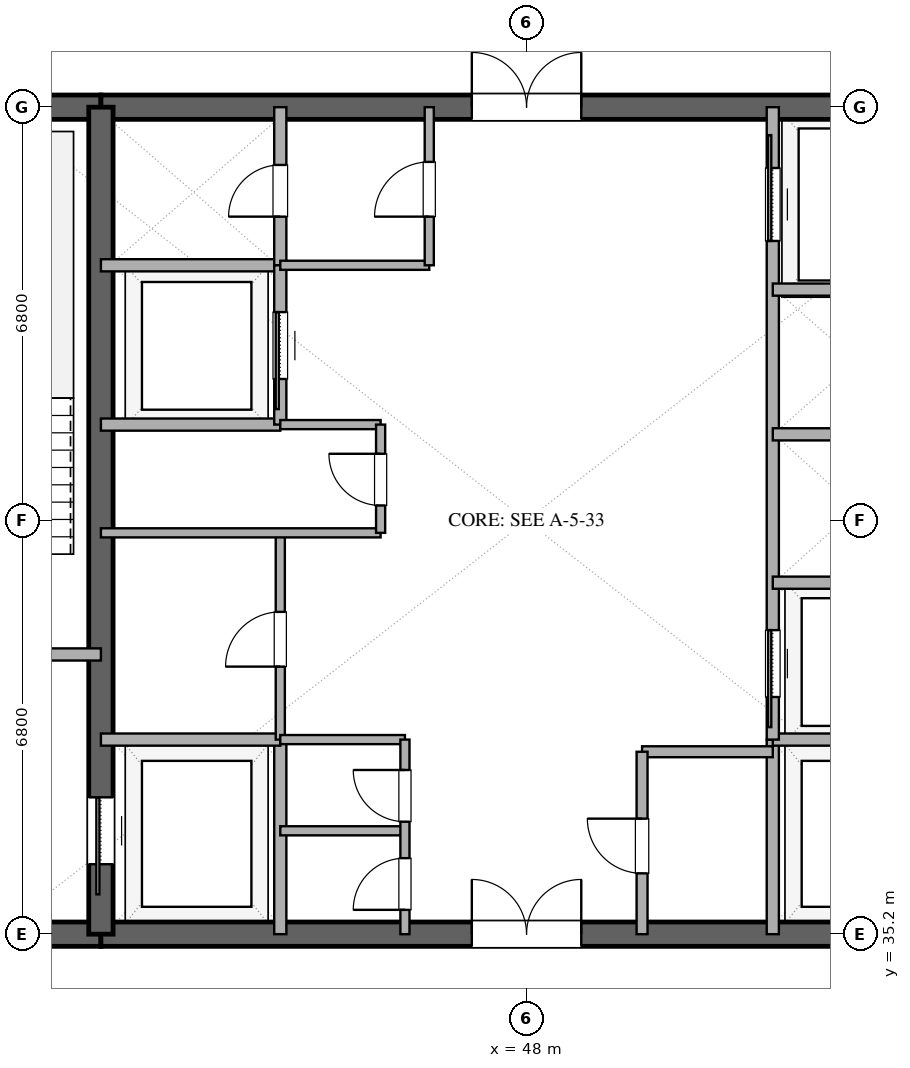
"""IFC4 building model, lengths in metres.
Left out: names, types, materials, properties, quantities, classifications, styles, units other than length and angle.
Written with IfcOpenShell. Run it as: python <this file> out.ifc"""

import sys

from ifc_helpers import new_model, si_unit, direction, frame, frame_2d, origin, place, context, subcontext, project, spatial, rectangle, extrude, element, fill, save


model = new_model("IFC4")
c1 = context("Model", 3, precision=1e-05, world=origin(), true_north=direction((0.0, 1.0)))
c2 = subcontext(c1, "Body", "Model", "MODEL_VIEW")
j1 = project(units=[si_unit("LENGTHUNIT", "METRE"), si_unit("PLANEANGLEUNIT", "RADIAN")], contexts=[c1])
p1 = place(None, origin())
s1 = spatial("IfcSite", under=j1, at=p1, CompositionType="ELEMENT")
p2 = place(p1, origin())
s2 = spatial("IfcBuilding", under=s1, at=p2, CompositionType="ELEMENT")
p3 = place(p2, frame((0.0, 0.0, 217.2)))
s3 = spatial("IfcBuildingStorey", under=s2, at=p3, CompositionType="ELEMENT", Elevation=217.2)
p4 = place(p3, frame((37.0, 35.2, 0.0), z_axis=(0.0, 0.0, 1.0), x_axis=(1.0, 0.0, 0.0)))
e1 = element("IfcWall", 1, at=p4, inside=s3, PredefinedType="SHEAR", context=c2, shape_type="SweptSolid", body=[
    extrude(rectangle(XDim=4.0, YDim=0.4, at=frame_2d((2.0, 0.0))), origin(), (0.0, 0.0, 1.0), 3.36),
])
p5 = place(p4, frame((1.4, 0.0, 0.0)))
e2 = element("IfcOpeningElement", 2, at=p5, cuts=e1, PredefinedType="OPENING", context=c2, shape_type="SweptSolid", body=[
    extrude(rectangle(XDim=1.2, YDim=2.15, at=frame_2d((0.6, 1.075))), frame((0.0, 0.21, 0.0), z_axis=(0.0, -1.0, 0.0), x_axis=(1.0, 0.0, 0.0)), (0.0, 0.0, 1.0), 0.42),
])
p6 = place(p3, frame((41.0, 35.2, 0.0), z_axis=(0.0, 0.0, 1.0), x_axis=(1.0, 0.0, 0.0)))
e3 = element("IfcWall", 3, at=p6, inside=s3, PredefinedType="SHEAR", context=c2, shape_type="SweptSolid", body=[
    extrude(rectangle(XDim=14.0, YDim=0.4, at=frame_2d((7.0, 0.0))), origin(), (0.0, 0.0, 1.0), 3.36),
])
p7 = place(p6, frame((6.1, 0.0, 0.0)))
e4 = element("IfcOpeningElement", 4, at=p7, cuts=e3, PredefinedType="OPENING", context=c2, shape_type="SweptSolid", body=[
    extrude(rectangle(XDim=1.8, YDim=2.25, at=frame_2d((0.9, 1.125))), frame((0.0, 0.21, 0.0), z_axis=(0.0, -1.0, 0.0), x_axis=(1.0, 0.0, 0.0)), (0.0, 0.0, 1.0), 0.42),
])
p8 = place(p3, frame((37.0, 48.8, 0.0), z_axis=(0.0, 0.0, 1.0), x_axis=(1.0, 0.0, 0.0)))
e5 = element("IfcWall", 5, at=p8, inside=s3, PredefinedType="SHEAR", context=c2, shape_type="SweptSolid", body=[
    extrude(rectangle(XDim=4.0, YDim=0.4, at=frame_2d((2.0, 0.0))), origin(), (0.0, 0.0, 1.0), 3.36),
])
p9 = place(p3, frame((41.0, 48.8, 0.0), z_axis=(0.0, 0.0, 1.0), x_axis=(1.0, 0.0, 0.0)))
e6 = element("IfcWall", 6, at=p9, inside=s3, PredefinedType="SHEAR", context=c2, shape_type="SweptSolid", body=[
    extrude(rectangle(XDim=14.0, YDim=0.4, at=frame_2d((7.0, 0.0))), origin(), (0.0, 0.0, 1.0), 3.36),
])
p10 = place(p9, frame((6.1, 0.0, 0.0)))
e7 = element("IfcOpeningElement", 7, at=p10, cuts=e6, PredefinedType="OPENING", context=c2, shape_type="SweptSolid", body=[
    extrude(rectangle(XDim=1.8, YDim=2.25, at=frame_2d((0.9, 1.125))), frame((0.0, 0.21, 0.0), z_axis=(0.0, -1.0, 0.0), x_axis=(1.0, 0.0, 0.0)), (0.0, 0.0, 1.0), 0.42),
])
p11 = place(p3, frame((41.0, 35.2, 0.0), z_axis=(0.0, 0.0, 1.0), x_axis=(0.0, 1.0, 0.0)))
e8 = element("IfcWall", 8, at=p11, inside=s3, PredefinedType="SHEAR", context=c2, shape_type="SweptSolid", body=[
    extrude(rectangle(XDim=13.6, YDim=0.4, at=frame_2d((6.8, 0.0))), origin(), (0.0, 0.0, 1.0), 3.36),
])
p12 = place(p11, frame((1.15, 0.0, 0.0)))
e9 = element("IfcOpeningElement", 9, at=p12, cuts=e8, PredefinedType="OPENING", context=c2, shape_type="SweptSolid", body=[
    extrude(rectangle(XDim=1.1, YDim=2.2, at=frame_2d((0.55, 1.1))), frame((0.0, 0.21, 0.0), z_axis=(0.0, -1.0, 0.0), x_axis=(1.0, 0.0, 0.0)), (0.0, 0.0, 1.0), 0.42),
])
p13 = place(p3, frame((37.0, 39.8, 0.0), z_axis=(0.0, 0.0, 1.0), x_axis=(1.0, 0.0, 0.0)))
e10 = element("IfcWall", 10, at=p13, inside=s3, PredefinedType="SOLIDWALL", context=c2, shape_type="SweptSolid", body=[
    extrude(rectangle(XDim=4.0, YDim=0.2, at=frame_2d((2.0, 0.0))), origin(), (0.0, 0.0, 1.0), 2.72),
])
p14 = place(p13, frame((1.45, 0.0, 0.0)))
e11 = element("IfcOpeningElement", 11, at=p14, cuts=e10, PredefinedType="OPENING", context=c2, shape_type="SweptSolid", body=[
    extrude(rectangle(XDim=1.1, YDim=2.15, at=frame_2d((0.55, 1.075))), frame((0.0, 0.11, 0.0), z_axis=(0.0, -1.0, 0.0), x_axis=(1.0, 0.0, 0.0)), (0.0, 0.0, 1.0), 0.22),
])
p15 = place(p3, frame((43.95, 35.2, 0.0), z_axis=(0.0, 0.0, 1.0), x_axis=(0.0, 1.0, 0.0)))
e12 = element("IfcWall", 12, at=p15, inside=s3, PredefinedType="SOLIDWALL", context=c2, shape_type="SweptSolid", body=[
    extrude(rectangle(XDim=3.2, YDim=0.2, at=frame_2d((1.6, 0.0))), origin(), (0.0, 0.0, 1.0), 2.72),
])
p16 = place(p3, frame((41.0, 38.4, 0.0), z_axis=(0.0, 0.0, 1.0), x_axis=(1.0, 0.0, 0.0)))
e13 = element("IfcWall", 13, at=p16, inside=s3, PredefinedType="SOLIDWALL", context=c2, shape_type="SweptSolid", body=[
    extrude(rectangle(XDim=2.95, YDim=0.2, at=frame_2d((1.475, 0.0))), origin(), (0.0, 0.0, 1.0), 2.72),
])
p17 = place(p3, frame((52.05, 35.2, 0.0), z_axis=(0.0, 0.0, 1.0), x_axis=(0.0, 1.0, 0.0)))
e14 = element("IfcWall", 14, at=p17, inside=s3, PredefinedType="SOLIDWALL", context=c2, shape_type="SweptSolid", body=[
    extrude(rectangle(XDim=3.2, YDim=0.2, at=frame_2d((1.6, 0.0))), origin(), (0.0, 0.0, 1.0), 2.72),
])
for number, where, z_axis, x_axis in (
    (15, (52.05, 38.4, 0.0), (0.0, 0.0, 1.0), (1.0, 0.0, 0.0)),
    (16, (41.0, 46.2, 0.0), (0.0, 0.0, 1.0), (1.0, 0.0, 0.0)),
):
    element("IfcWall", number, at=place(p3, frame(where, z_axis=z_axis, x_axis=x_axis)), inside=s3, PredefinedType="SOLIDWALL", context=c2, shape_type="SweptSolid", body=[
        extrude(rectangle(XDim=2.95, YDim=0.2, at=frame_2d((1.475, 0.0))), origin(), (0.0, 0.0, 1.0), 2.72),
    ])
p18 = place(p3, frame((43.95, 46.2, 0.0), z_axis=(0.0, 0.0, 1.0), x_axis=(0.0, 1.0, 0.0)))
e17 = element("IfcWall", 17, at=p18, inside=s3, PredefinedType="SOLIDWALL", context=c2, shape_type="SweptSolid", body=[
    extrude(rectangle(XDim=2.6, YDim=0.2, at=frame_2d((1.3, 0.0))), origin(), (0.0, 0.0, 1.0), 2.72),
])
p19 = place(p18, frame((0.8, 0.0, 0.0)))
e18 = element("IfcOpeningElement", 18, at=p19, cuts=e17, PredefinedType="OPENING", context=c2, shape_type="SweptSolid", body=[
    extrude(rectangle(XDim=0.85, YDim=2.15, at=frame_2d((0.425, 1.075))), frame((0.0, 0.11, 0.0), z_axis=(0.0, -1.0, 0.0), x_axis=(1.0, 0.0, 0.0)), (0.0, 0.0, 1.0), 0.22),
])
p20 = place(p3, frame((41.0, 43.58, 0.0), z_axis=(0.0, 0.0, 1.0), x_axis=(1.0, 0.0, 0.0)))
e19 = element("IfcWall", 19, at=p20, inside=s3, PredefinedType="SOLIDWALL", context=c2, shape_type="SweptSolid", body=[
    extrude(rectangle(XDim=2.95, YDim=0.2, at=frame_2d((1.475, 0.0))), origin(), (0.0, 0.0, 1.0), 2.72),
])
p21 = place(p3, frame((43.95, 43.58, 0.0), z_axis=(0.0, 0.0, 1.0), x_axis=(0.0, 1.0, 0.0)))
e20 = element("IfcWall", 20, at=p21, inside=s3, PredefinedType="SOLIDWALL", context=c2, shape_type="SweptSolid", body=[
    extrude(rectangle(XDim=2.62, YDim=0.2, at=frame_2d((1.31, 0.0))), origin(), (0.0, 0.0, 1.0), 2.72),
])
p22 = place(p21, frame((0.75, 0.0, 0.0)))
e21 = element("IfcOpeningElement", 21, at=p22, cuts=e20, PredefinedType="OPENING", context=c2, shape_type="SweptSolid", body=[
    extrude(rectangle(XDim=1.1, YDim=2.2, at=frame_2d((0.55, 1.1))), frame((0.0, 0.11, 0.0), z_axis=(0.0, -1.0, 0.0), x_axis=(1.0, 0.0, 0.0)), (0.0, 0.0, 1.0), 0.22),
])
p23 = place(p3, frame((43.95, 38.4, 0.0), z_axis=(0.0, 0.0, 1.0), x_axis=(0.0, 1.0, 0.0)))
e22 = element("IfcWall", 22, at=p23, inside=s3, PredefinedType="PARTITIONING", context=c2, shape_type="SweptSolid", body=[
    extrude(rectangle(XDim=3.4, YDim=0.15, at=frame_2d((1.7, 0.0))), origin(), (0.0, 0.0, 1.0), 2.72),
])
p24 = place(p23, frame((1.2, 0.0, 0.0)))
e23 = element("IfcOpeningElement", 23, at=p24, cuts=e22, PredefinedType="OPENING", context=c2, shape_type="SweptSolid", body=[
    extrude(rectangle(XDim=0.9, YDim=2.15, at=frame_2d((0.45, 1.075))), frame((0.0, 0.085, 0.0), z_axis=(0.0, -1.0, 0.0), x_axis=(1.0, 0.0, 0.0)), (0.0, 0.0, 1.0), 0.17),
])
p25 = place(p3, frame((41.0, 41.8, 0.0), z_axis=(0.0, 0.0, 1.0), x_axis=(1.0, 0.0, 0.0)))
e24 = element("IfcWall", 24, at=p25, inside=s3, PredefinedType="PARTITIONING", context=c2, shape_type="SweptSolid", body=[
    extrude(rectangle(XDim=4.6, YDim=0.15, at=frame_2d((2.3, 0.0))), origin(), (0.0, 0.0, 1.0), 2.72),
])
p26 = place(p3, frame((43.95, 43.58, 0.0), z_axis=(0.0, 0.0, 1.0), x_axis=(1.0, 0.0, 0.0)))
e25 = element("IfcWall", 25, at=p26, inside=s3, PredefinedType="PARTITIONING", context=c2, shape_type="SweptSolid", body=[
    extrude(rectangle(XDim=1.65, YDim=0.15, at=frame_2d((0.825, 0.0))), origin(), (0.0, 0.0, 1.0), 2.72),
])
p27 = place(p3, frame((45.6, 41.8, 0.0), z_axis=(0.0, 0.0, 1.0), x_axis=(0.0, 1.0, 0.0)))
e26 = element("IfcWall", 26, at=p27, inside=s3, PredefinedType="PARTITIONING", context=c2, shape_type="SweptSolid", body=[
    extrude(rectangle(XDim=1.78, YDim=0.15, at=frame_2d((0.89, 0.0))), origin(), (0.0, 0.0, 1.0), 2.72),
])
p28 = place(p27, frame((0.45, 0.0, 0.0)))
e27 = element("IfcOpeningElement", 27, at=p28, cuts=e26, PredefinedType="OPENING", context=c2, shape_type="SweptSolid", body=[
    extrude(rectangle(XDim=0.85, YDim=2.15, at=frame_2d((0.425, 1.075))), frame((0.0, 0.085, 0.0), z_axis=(0.0, -1.0, 0.0), x_axis=(1.0, 0.0, 0.0)), (0.0, 0.0, 1.0), 0.17),
])
p29 = place(p3, frame((52.05, 38.4, 0.0), z_axis=(0.0, 0.0, 1.0), x_axis=(0.0, 1.0, 0.0)))
e28 = element("IfcWall", 28, at=p29, inside=s3, PredefinedType="SOLIDWALL", context=c2, shape_type="SweptSolid", body=[
    extrude(rectangle(XDim=10.4, YDim=0.2, at=frame_2d((5.2, 0.0))), origin(), (0.0, 0.0, 1.0), 2.72),
])
p30 = place(p29, frame((0.7, 0.0, 0.0)))
e29 = element("IfcOpeningElement", 29, at=p30, cuts=e28, PredefinedType="OPENING", context=c2, shape_type="SweptSolid", body=[
    extrude(rectangle(XDim=1.1, YDim=2.2, at=frame_2d((0.55, 1.1))), frame((0.0, 0.11, 0.0), z_axis=(0.0, -1.0, 0.0), x_axis=(1.0, 0.0, 0.0)), (0.0, 0.0, 1.0), 0.22),
])
p31 = place(p29, frame((8.2, 0.0, 0.0)))
e30 = element("IfcOpeningElement", 30, at=p31, cuts=e28, PredefinedType="OPENING", context=c2, shape_type="SweptSolid", body=[
    extrude(rectangle(XDim=1.2, YDim=2.2, at=frame_2d((0.6, 1.1))), frame((0.0, 0.11, 0.0), z_axis=(0.0, -1.0, 0.0), x_axis=(1.0, 0.0, 0.0)), (0.0, 0.0, 1.0), 0.22),
])
for number, where, z_axis, x_axis in (
    (31, (52.05, 40.98, 0.0), (0.0, 0.0, 1.0), (1.0, 0.0, 0.0)),
    (32, (52.05, 43.42, 0.0), (0.0, 0.0, 1.0), (1.0, 0.0, 0.0)),
    (33, (52.05, 45.8, 0.0), (0.0, 0.0, 1.0), (1.0, 0.0, 0.0)),
):
    element("IfcWall", number, at=place(p3, frame(where, z_axis=z_axis, x_axis=x_axis)), inside=s3, PredefinedType="SOLIDWALL", context=c2, shape_type="SweptSolid", body=[
        extrude(rectangle(XDim=2.95, YDim=0.2, at=frame_2d((1.475, 0.0))), origin(), (0.0, 0.0, 1.0), 2.72),
    ])
for number, where, z_axis, x_axis in (
    (34, (43.95, 36.9, 0.0), (0.0, 0.0, 1.0), (1.0, 0.0, 0.0)),
    (35, (43.95, 38.4, 0.0), (0.0, 0.0, 1.0), (1.0, 0.0, 0.0)),
):
    element("IfcWall", number, at=place(p3, frame(where, z_axis=z_axis, x_axis=x_axis)), inside=s3, PredefinedType="PARTITIONING", context=c2, shape_type="SweptSolid", body=[
        extrude(rectangle(XDim=2.05, YDim=0.15, at=frame_2d((1.025, 0.0))), origin(), (0.0, 0.0, 1.0), 2.72),
    ])
p32 = place(p3, frame((46.0, 35.2, 0.0), z_axis=(0.0, 0.0, 1.0), x_axis=(0.0, 1.0, 0.0)))
e36 = element("IfcWall", 36, at=p32, inside=s3, PredefinedType="PARTITIONING", context=c2, shape_type="SweptSolid", body=[
    extrude(rectangle(XDim=3.2, YDim=0.15, at=frame_2d((1.6, 0.0))), origin(), (0.0, 0.0, 1.0), 2.72),
])
p33 = place(p32, frame((0.4, 0.0, 0.0)))
e37 = element("IfcOpeningElement", 37, at=p33, cuts=e36, PredefinedType="OPENING", context=c2, shape_type="SweptSolid", body=[
    extrude(rectangle(XDim=0.85, YDim=2.15, at=frame_2d((0.425, 1.075))), frame((0.0, 0.085, 0.0), z_axis=(0.0, -1.0, 0.0), x_axis=(1.0, 0.0, 0.0)), (0.0, 0.0, 1.0), 0.17),
])
p34 = place(p32, frame((1.85, 0.0, 0.0)))
e38 = element("IfcOpeningElement", 38, at=p34, cuts=e36, PredefinedType="OPENING", context=c2, shape_type="SweptSolid", body=[
    extrude(rectangle(XDim=0.85, YDim=2.15, at=frame_2d((0.425, 1.075))), frame((0.0, 0.085, 0.0), z_axis=(0.0, -1.0, 0.0), x_axis=(1.0, 0.0, 0.0)), (0.0, 0.0, 1.0), 0.17),
])
p35 = place(p3, frame((43.95, 46.2, 0.0), z_axis=(0.0, 0.0, 1.0), x_axis=(1.0, 0.0, 0.0)))
e39 = element("IfcWall", 39, at=p35, inside=s3, PredefinedType="PARTITIONING", context=c2, shape_type="SweptSolid", body=[
    extrude(rectangle(XDim=2.45, YDim=0.15, at=frame_2d((1.225, 0.0))), origin(), (0.0, 0.0, 1.0), 2.72),
])
p36 = place(p3, frame((46.4, 46.2, 0.0), z_axis=(0.0, 0.0, 1.0), x_axis=(0.0, 1.0, 0.0)))
e40 = element("IfcWall", 40, at=p36, inside=s3, PredefinedType="PARTITIONING", context=c2, shape_type="SweptSolid", body=[
    extrude(rectangle(XDim=2.6, YDim=0.15, at=frame_2d((1.3, 0.0))), origin(), (0.0, 0.0, 1.0), 2.72),
])
p37 = place(p36, frame((0.8, 0.0, 0.0)))
e41 = element("IfcOpeningElement", 41, at=p37, cuts=e40, PredefinedType="OPENING", context=c2, shape_type="SweptSolid", body=[
    extrude(rectangle(XDim=0.9, YDim=2.15, at=frame_2d((0.45, 1.075))), frame((0.0, 0.085, 0.0), z_axis=(0.0, -1.0, 0.0), x_axis=(1.0, 0.0, 0.0)), (0.0, 0.0, 1.0), 0.17),
])
p38 = place(p3, frame((49.9, 38.2, 0.0), z_axis=(0.0, 0.0, 1.0), x_axis=(1.0, 0.0, 0.0)))
e42 = element("IfcWall", 42, at=p38, inside=s3, PredefinedType="PLUMBINGWALL", context=c2, shape_type="SweptSolid", body=[
    extrude(rectangle(XDim=2.15, YDim=0.18, at=frame_2d((1.075, 0.0))), origin(), (0.0, 0.0, 1.0), 2.72),
])
p39 = place(p3, frame((49.9, 35.2, 0.0), z_axis=(0.0, 0.0, 1.0), x_axis=(0.0, 1.0, 0.0)))
e43 = element("IfcWall", 43, at=p39, inside=s3, PredefinedType="PLUMBINGWALL", context=c2, shape_type="SweptSolid", body=[
    extrude(rectangle(XDim=3.0, YDim=0.18, at=frame_2d((1.5, 0.0))), origin(), (0.0, 0.0, 1.0), 2.72),
])
p40 = place(p39, frame((1.0, 0.0, 0.0)))
e44 = element("IfcOpeningElement", 44, at=p40, cuts=e43, PredefinedType="OPENING", context=c2, shape_type="SweptSolid", body=[
    extrude(rectangle(XDim=0.9, YDim=2.1, at=frame_2d((0.45, 1.05))), frame((0.0, 0.1, 0.0), z_axis=(0.0, -1.0, 0.0), x_axis=(1.0, 0.0, 0.0)), (0.0, 0.0, 1.0), 0.2),
])
p41 = place(p12, origin())
e45 = element("IfcDoor", 45, at=p41, inside=s3, OperationType="SLIDING_TO_LEFT", PredefinedType="DOOR", context=c2, shape_type="SweptSolid", body=[
    extrude(rectangle(XDim=1.1, YDim=2.2, at=frame_2d((0.55, 1.1))), frame((0.0, 0.025, 0.0), z_axis=(0.0, -1.0, 0.0), x_axis=(1.0, 0.0, 0.0)), (0.0, 0.0, 1.0), 0.05),
])
fill(e9, e45)
p42 = place(p7, origin())
e46 = element("IfcDoor", 46, at=p42, inside=s3, OperationType="DOUBLE_DOOR_SINGLE_SWING", PredefinedType="DOOR", context=c2, shape_type="SweptSolid", body=[
    extrude(rectangle(XDim=1.8, YDim=2.25, at=frame_2d((0.9, 1.125))), frame((0.0, 0.025, 0.0), z_axis=(0.0, -1.0, 0.0), x_axis=(1.0, 0.0, 0.0)), (0.0, 0.0, 1.0), 0.05),
])
fill(e4, e46)
p43 = place(p10, origin())
e47 = element("IfcDoor", 47, at=p43, inside=s3, OperationType="DOUBLE_DOOR_SINGLE_SWING", PredefinedType="DOOR", context=c2, shape_type="SweptSolid", body=[
    extrude(rectangle(XDim=1.8, YDim=2.25, at=frame_2d((0.9, 1.125))), frame((0.0, 0.025, 0.0), z_axis=(0.0, -1.0, 0.0), x_axis=(1.0, 0.0, 0.0)), (0.0, 0.0, 1.0), 0.05),
])
fill(e7, e47)
p44 = place(p19, origin())
e48 = element("IfcDoor", 48, at=p44, inside=s3, OperationType="SINGLE_SWING_LEFT", PredefinedType="DOOR", context=c2, shape_type="SweptSolid", body=[
    extrude(rectangle(XDim=0.85, YDim=2.15, at=frame_2d((0.425, 1.075))), frame((0.0, 0.025, 0.0), z_axis=(0.0, -1.0, 0.0), x_axis=(1.0, 0.0, 0.0)), (0.0, 0.0, 1.0), 0.05),
])
fill(e18, e48)
p45 = place(p22, origin())
e49 = element("IfcDoor", 49, at=p45, inside=s3, OperationType="SLIDING_TO_LEFT", PredefinedType="DOOR", context=c2, shape_type="SweptSolid", body=[
    extrude(rectangle(XDim=1.1, YDim=2.2, at=frame_2d((0.55, 1.1))), frame((0.0, 0.025, 0.0), z_axis=(0.0, -1.0, 0.0), x_axis=(1.0, 0.0, 0.0)), (0.0, 0.0, 1.0), 0.05),
])
fill(e21, e49)
p46 = place(p24, origin())
e50 = element("IfcDoor", 50, at=p46, inside=s3, OperationType="SINGLE_SWING_LEFT", PredefinedType="DOOR", context=c2, shape_type="SweptSolid", body=[
    extrude(rectangle(XDim=0.9, YDim=2.15, at=frame_2d((0.45, 1.075))), frame((0.0, 0.025, 0.0), z_axis=(0.0, -1.0, 0.0), x_axis=(1.0, 0.0, 0.0)), (0.0, 0.0, 1.0), 0.05),
])
fill(e23, e50)
p47 = place(p28, origin())
e51 = element("IfcDoor", 51, at=p47, inside=s3, OperationType="SINGLE_SWING_RIGHT", PredefinedType="DOOR", context=c2, shape_type="SweptSolid", body=[
    extrude(rectangle(XDim=0.85, YDim=2.15, at=frame_2d((0.425, 1.075))), frame((0.0, 0.025, 0.0), z_axis=(0.0, -1.0, 0.0), x_axis=(1.0, 0.0, 0.0)), (0.0, 0.0, 1.0), 0.05),
])
fill(e27, e51)
p48 = place(p30, origin())
e52 = element("IfcDoor", 52, at=p48, inside=s3, OperationType="SLIDING_TO_LEFT", PredefinedType="DOOR", context=c2, shape_type="SweptSolid", body=[
    extrude(rectangle(XDim=1.1, YDim=2.2, at=frame_2d((0.55, 1.1))), frame((0.0, 0.025, 0.0), z_axis=(0.0, -1.0, 0.0), x_axis=(1.0, 0.0, 0.0)), (0.0, 0.0, 1.0), 0.05),
])
fill(e29, e52)
p49 = place(p31, origin())
e53 = element("IfcDoor", 53, at=p49, inside=s3, OperationType="SLIDING_TO_RIGHT", PredefinedType="DOOR", context=c2, shape_type="SweptSolid", body=[
    extrude(rectangle(XDim=1.2, YDim=2.2, at=frame_2d((0.6, 1.1))), frame((0.0, 0.025, 0.0), z_axis=(0.0, -1.0, 0.0), x_axis=(1.0, 0.0, 0.0)), (0.0, 0.0, 1.0), 0.05),
])
fill(e30, e53)
p50 = place(p33, origin())
e54 = element("IfcDoor", 54, at=p50, inside=s3, OperationType="SINGLE_SWING_LEFT", PredefinedType="DOOR", context=c2, shape_type="SweptSolid", body=[
    extrude(rectangle(XDim=0.85, YDim=2.15, at=frame_2d((0.425, 1.075))), frame((0.0, 0.025, 0.0), z_axis=(0.0, -1.0, 0.0), x_axis=(1.0, 0.0, 0.0)), (0.0, 0.0, 1.0), 0.05),
])
fill(e37, e54)
p51 = place(p34, origin())
e55 = element("IfcDoor", 55, at=p51, inside=s3, OperationType="SINGLE_SWING_RIGHT", PredefinedType="DOOR", context=c2, shape_type="SweptSolid", body=[
    extrude(rectangle(XDim=0.85, YDim=2.15, at=frame_2d((0.425, 1.075))), frame((0.0, 0.025, 0.0), z_axis=(0.0, -1.0, 0.0), x_axis=(1.0, 0.0, 0.0)), (0.0, 0.0, 1.0), 0.05),
])
fill(e38, e55)
p52 = place(p37, origin())
e56 = element("IfcDoor", 56, at=p52, inside=s3, OperationType="SINGLE_SWING_LEFT", PredefinedType="DOOR", context=c2, shape_type="SweptSolid", body=[
    extrude(rectangle(XDim=0.9, YDim=2.15, at=frame_2d((0.45, 1.075))), frame((0.0, 0.025, 0.0), z_axis=(0.0, -1.0, 0.0), x_axis=(1.0, 0.0, 0.0)), (0.0, 0.0, 1.0), 0.05),
])
fill(e41, e56)
p53 = place(p40, origin())
e57 = element("IfcDoor", 57, at=p53, inside=s3, OperationType="SINGLE_SWING_RIGHT", PredefinedType="DOOR", context=c2, shape_type="SweptSolid", body=[
    extrude(rectangle(XDim=0.9, YDim=2.1, at=frame_2d((0.45, 1.05))), frame((0.0, 0.025, 0.0), z_axis=(0.0, -1.0, 0.0), x_axis=(1.0, 0.0, 0.0)), (0.0, 0.0, 1.0), 0.05),
])
fill(e44, e57)
save(model, sys.argv[1])
